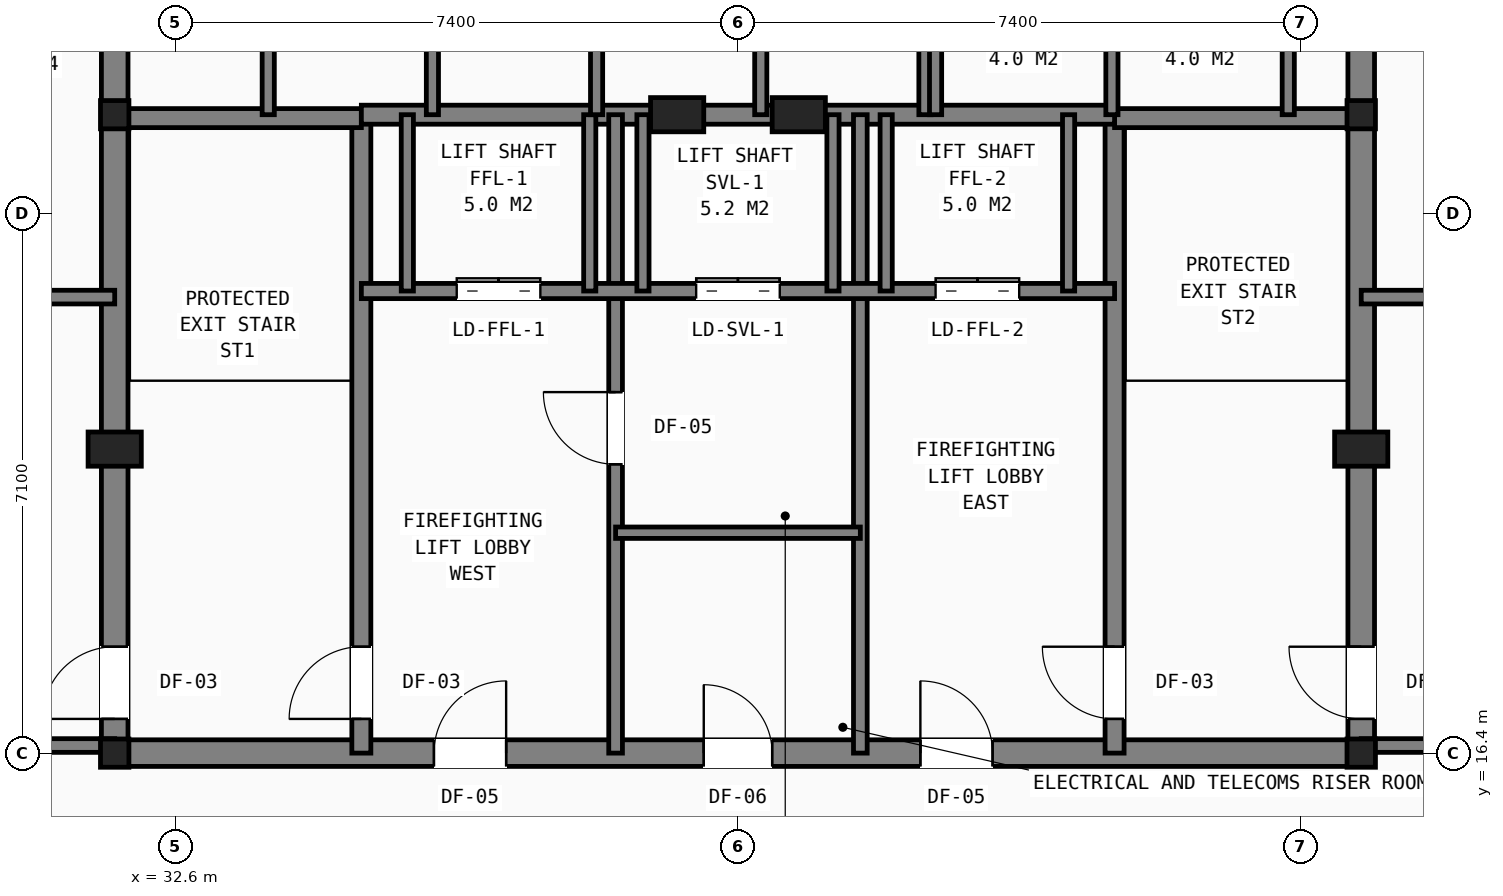
"""IFC4 building model, lengths in metres.
Left out: names, types, materials, properties, quantities, classifications, styles, units other than length and angle.
Written with IfcOpenShell. Run it as: python <this file> out.ifc"""

import sys

from ifc_helpers import new_model, si_unit, direction, frame, frame_2d, origin, origin_2d, place, context, subcontext, project, spatial, rectangle, i_section, extrude, element, fill, save


model = new_model("IFC4")
c1 = context("Model", 3, precision=1e-05, world=origin(), true_north=direction((0.0, 1.0)))
c2 = subcontext(c1, "Body", "Model", "MODEL_VIEW")
j1 = project(units=[si_unit("LENGTHUNIT", "METRE"), si_unit("PLANEANGLEUNIT", "RADIAN")], contexts=[c1])
p1 = place(None, origin())
s1 = spatial("IfcSite", under=j1, at=p1, CompositionType="ELEMENT")
p2 = place(p1, origin())
s2 = spatial("IfcBuilding", under=s1, at=p2, CompositionType="ELEMENT")
p3 = place(p2, frame((0.0, 0.0, 157.4)))
s3 = spatial("IfcBuildingStorey", under=s2, at=p3, CompositionType="ELEMENT", Elevation=157.4)
for number, where, z_axis, x_axis in (
    (1, (31.8, 16.4, 0.0), (0.0, 0.0, 1.0), (1.0, 0.0, 0.0)),
    (2, (48.2, 16.4, 0.0), (0.0, 0.0, 1.0), (1.0, 0.0, 0.0)),
    (3, (31.8, 24.8, 0.0), (0.0, 0.0, 1.0), (1.0, 0.0, 0.0)),
    (4, (48.2, 24.8, 0.0), (0.0, 0.0, 1.0), (1.0, 0.0, 0.0)),
):
    element("IfcColumn", number, at=place(p3, frame(where, z_axis=z_axis, x_axis=x_axis)), inside=s3, PredefinedType="COLUMN", context=c2, shape_type="SweptSolid", body=[
        extrude(i_section(OverallWidth=0.374, OverallDepth=0.372, WebThickness=0.016, FlangeThickness=0.026, at=origin_2d()), origin(), (0.0, 0.0, 1.0), 4.6),
    ])
for number, where, z_axis, x_axis in (
    (5, (31.8, 20.4, 0.0), (0.0, 0.0, 1.0), (1.0, 0.0, 0.0)),
    (6, (48.2, 20.4, 0.0), (0.0, 0.0, 1.0), (1.0, 0.0, 0.0)),
    (7, (39.2, 24.8, 0.0), (0.0, 0.0, 1.0), (1.0, 0.0, 0.0)),
    (8, (40.8, 24.8, 0.0), (0.0, 0.0, 1.0), (1.0, 0.0, 0.0)),
):
    element("IfcColumn", number, at=place(p3, frame(where, z_axis=z_axis, x_axis=x_axis)), inside=s3, PredefinedType="PILASTER", context=c2, shape_type="SweptSolid", body=[
        extrude(rectangle(XDim=0.7, YDim=0.45, at=origin_2d()), origin(), (0.0, 0.0, 1.0), 4.6),
    ])
p4 = place(p3, frame((31.8, 16.4, 0.0), z_axis=(0.0, 0.0, 1.0), x_axis=(1.0, 0.0, 0.0)))
e9 = element("IfcWall", 9, at=p4, inside=s3, PredefinedType="SHEAR", context=c2, shape_type="SweptSolid", body=[
    extrude(rectangle(XDim=16.4, YDim=0.35, at=frame_2d((8.2, 0.0))), origin(), (0.0, 0.0, 1.0), 4.36),
])
p5 = place(p4, frame((7.75, 0.0, 0.0)))
e10 = element("IfcOpeningElement", 10, at=p5, cuts=e9, PredefinedType="OPENING", context=c2, shape_type="SweptSolid", body=[
    extrude(rectangle(XDim=0.9, YDim=2.1, at=frame_2d((0.45, 1.05))), frame((0.0, 0.185, 0.0), z_axis=(0.0, -1.0, 0.0), x_axis=(1.0, 0.0, 0.0)), (0.0, 0.0, 1.0), 0.37),
])
p6 = place(p4, frame((4.2, 0.0, 0.0)))
e11 = element("IfcOpeningElement", 11, at=p6, cuts=e9, PredefinedType="OPENING", context=c2, shape_type="SweptSolid", body=[
    extrude(rectangle(XDim=0.95, YDim=2.1, at=frame_2d((0.475, 1.05))), frame((0.0, 0.185, 0.0), z_axis=(0.0, -1.0, 0.0), x_axis=(1.0, 0.0, 0.0)), (0.0, 0.0, 1.0), 0.37),
])
p7 = place(p4, frame((10.6, 0.0, 0.0)))
e12 = element("IfcOpeningElement", 12, at=p7, cuts=e9, PredefinedType="OPENING", context=c2, shape_type="SweptSolid", body=[
    extrude(rectangle(XDim=0.95, YDim=2.1, at=frame_2d((0.475, 1.05))), frame((0.0, 0.185, 0.0), z_axis=(0.0, -1.0, 0.0), x_axis=(1.0, 0.0, 0.0)), (0.0, 0.0, 1.0), 0.37),
])
p8 = place(p3, frame((31.8, 16.4, 0.0), z_axis=(0.0, 0.0, 1.0), x_axis=(0.0, 1.0, 0.0)))
e13 = element("IfcWall", 13, at=p8, inside=s3, PredefinedType="SHEAR", context=c2, shape_type="SweptSolid", body=[
    extrude(rectangle(XDim=14.8, YDim=0.35, at=frame_2d((7.4, 0.0))), origin(), (0.0, 0.0, 1.0), 4.36),
])
p9 = place(p8, frame((11.0, 0.0, 0.0)))
e14 = element("IfcOpeningElement", 14, at=p9, cuts=e13, PredefinedType="OPENING", context=c2, shape_type="SweptSolid", body=[
    extrude(rectangle(XDim=1.1, YDim=2.15, at=frame_2d((0.55, 1.075))), frame((0.0, 0.185, 0.0), z_axis=(0.0, -1.0, 0.0), x_axis=(1.0, 0.0, 0.0)), (0.0, 0.0, 1.0), 0.37),
])
p10 = place(p8, frame((0.45, 0.0, 0.0)))
e15 = element("IfcOpeningElement", 15, at=p10, cuts=e13, PredefinedType="OPENING", context=c2, shape_type="SweptSolid", body=[
    extrude(rectangle(XDim=0.95, YDim=2.1, at=frame_2d((0.475, 1.05))), frame((0.0, 0.185, 0.0), z_axis=(0.0, -1.0, 0.0), x_axis=(1.0, 0.0, 0.0)), (0.0, 0.0, 1.0), 0.37),
])
p11 = place(p3, frame((48.2, 16.4, 0.0), z_axis=(0.0, 0.0, 1.0), x_axis=(0.0, 1.0, 0.0)))
e16 = element("IfcWall", 16, at=p11, inside=s3, PredefinedType="SHEAR", context=c2, shape_type="SweptSolid", body=[
    extrude(rectangle(XDim=14.8, YDim=0.35, at=frame_2d((7.4, 0.0))), origin(), (0.0, 0.0, 1.0), 4.36),
])
p12 = place(p11, frame((11.0, 0.0, 0.0)))
e17 = element("IfcOpeningElement", 17, at=p12, cuts=e16, PredefinedType="OPENING", context=c2, shape_type="SweptSolid", body=[
    extrude(rectangle(XDim=1.1, YDim=2.15, at=frame_2d((0.55, 1.075))), frame((0.0, 0.185, 0.0), z_axis=(0.0, -1.0, 0.0), x_axis=(1.0, 0.0, 0.0)), (0.0, 0.0, 1.0), 0.37),
])
p13 = place(p11, frame((0.45, 0.0, 0.0)))
e18 = element("IfcOpeningElement", 18, at=p13, cuts=e16, PredefinedType="OPENING", context=c2, shape_type="SweptSolid", body=[
    extrude(rectangle(XDim=0.95, YDim=2.1, at=frame_2d((0.475, 1.05))), frame((0.0, 0.185, 0.0), z_axis=(0.0, -1.0, 0.0), x_axis=(1.0, 0.0, 0.0)), (0.0, 0.0, 1.0), 0.37),
])
p14 = place(p3, frame((35.045, 16.4, 0.0), z_axis=(0.0, 0.0, 1.0), x_axis=(0.0, 1.0, 0.0)))
e19 = element("IfcWall", 19, at=p14, inside=s3, PredefinedType="SHEAR", context=c2, shape_type="SweptSolid", body=[
    extrude(rectangle(XDim=8.4, YDim=0.25, at=frame_2d((4.2, 0.0))), origin(), (0.0, 0.0, 1.0), 4.36),
])
p15 = place(p14, frame((0.45, 0.0, 0.0)))
e20 = element("IfcOpeningElement", 20, at=p15, cuts=e19, PredefinedType="OPENING", context=c2, shape_type="SweptSolid", body=[
    extrude(rectangle(XDim=0.95, YDim=2.1, at=frame_2d((0.475, 1.05))), frame((0.0, 0.135, 0.0), z_axis=(0.0, -1.0, 0.0), x_axis=(1.0, 0.0, 0.0)), (0.0, 0.0, 1.0), 0.27),
])
p16 = place(p3, frame((31.8, 24.755, 0.0), z_axis=(0.0, 0.0, 1.0), x_axis=(1.0, 0.0, 0.0)))
e21 = element("IfcWall", 21, at=p16, inside=s3, PredefinedType="SHEAR", context=c2, shape_type="SweptSolid", body=[
    extrude(rectangle(XDim=3.245, YDim=0.25, at=frame_2d((1.623, 0.0))), origin(), (0.0, 0.0, 1.0), 4.36),
])
p17 = place(p3, frame((44.955, 16.4, 0.0), z_axis=(0.0, 0.0, 1.0), x_axis=(0.0, 1.0, 0.0)))
e22 = element("IfcWall", 22, at=p17, inside=s3, PredefinedType="SHEAR", context=c2, shape_type="SweptSolid", body=[
    extrude(rectangle(XDim=8.4, YDim=0.25, at=frame_2d((4.2, 0.0))), origin(), (0.0, 0.0, 1.0), 4.36),
])
p18 = place(p17, frame((0.45, 0.0, 0.0)))
e23 = element("IfcOpeningElement", 23, at=p18, cuts=e22, PredefinedType="OPENING", context=c2, shape_type="SweptSolid", body=[
    extrude(rectangle(XDim=0.95, YDim=2.1, at=frame_2d((0.475, 1.05))), frame((0.0, 0.135, 0.0), z_axis=(0.0, -1.0, 0.0), x_axis=(1.0, 0.0, 0.0)), (0.0, 0.0, 1.0), 0.27),
])
p19 = place(p3, frame((44.955, 24.755, 0.0), z_axis=(0.0, 0.0, 1.0), x_axis=(1.0, 0.0, 0.0)))
e24 = element("IfcWall", 24, at=p19, inside=s3, PredefinedType="SHEAR", context=c2, shape_type="SweptSolid", body=[
    extrude(rectangle(XDim=3.245, YDim=0.25, at=frame_2d((1.623, 0.0))), origin(), (0.0, 0.0, 1.0), 4.36),
])
p20 = place(p3, frame((35.045, 24.8, 0.0), z_axis=(0.0, 0.0, 1.0), x_axis=(1.0, 0.0, 0.0)))
e25 = element("IfcWall", 25, at=p20, inside=s3, PredefinedType="SHEAR", context=c2, shape_type="SweptSolid", body=[
    extrude(rectangle(XDim=9.91, YDim=0.25, at=frame_2d((4.955, 0.0))), origin(), (0.0, 0.0, 1.0), 4.36),
])
p21 = place(p3, frame((38.39, 16.4, 0.0), z_axis=(0.0, 0.0, 1.0), x_axis=(0.0, 1.0, 0.0)))
e26 = element("IfcWall", 26, at=p21, inside=s3, PredefinedType="PARTITIONING", context=c2, shape_type="SweptSolid", body=[
    extrude(rectangle(XDim=8.4, YDim=0.18, at=frame_2d((4.2, 0.0))), origin(), (0.0, 0.0, 1.0), 4.088),
])
p22 = place(p21, frame((3.8, 0.0, 0.0)))
e27 = element("IfcOpeningElement", 27, at=p22, cuts=e26, PredefinedType="OPENING", context=c2, shape_type="SweptSolid", body=[
    extrude(rectangle(XDim=0.95, YDim=2.1, at=frame_2d((0.475, 1.05))), frame((0.0, 0.1, 0.0), z_axis=(0.0, -1.0, 0.0), x_axis=(1.0, 0.0, 0.0)), (0.0, 0.0, 1.0), 0.2),
])
p23 = place(p3, frame((41.61, 16.4, 0.0), z_axis=(0.0, 0.0, 1.0), x_axis=(0.0, 1.0, 0.0)))
e28 = element("IfcWall", 28, at=p23, inside=s3, PredefinedType="PARTITIONING", context=c2, shape_type="SweptSolid", body=[
    extrude(rectangle(XDim=8.4, YDim=0.18, at=frame_2d((4.2, 0.0))), origin(), (0.0, 0.0, 1.0), 4.088),
])
p24 = place(p3, frame((35.045, 22.48, 0.0), z_axis=(0.0, 0.0, 1.0), x_axis=(1.0, 0.0, 0.0)))
e29 = element("IfcWall", 29, at=p24, inside=s3, PredefinedType="SOLIDWALL", context=c2, shape_type="SweptSolid", body=[
    extrude(rectangle(XDim=9.91, YDim=0.2, at=frame_2d((4.955, 0.0))), origin(), (0.0, 0.0, 1.0), 4.36),
])
p25 = place(p24, frame((1.255, 0.0, 0.0)))
e30 = element("IfcOpeningElement", 30, at=p25, cuts=e29, PredefinedType="OPENING", context=c2, shape_type="SweptSolid", body=[
    extrude(rectangle(XDim=1.1, YDim=2.15, at=frame_2d((0.55, 1.075))), frame((0.0, 0.11, 0.0), z_axis=(0.0, -1.0, 0.0), x_axis=(1.0, 0.0, 0.0)), (0.0, 0.0, 1.0), 0.22),
])
p26 = place(p24, frame((7.555, 0.0, 0.0)))
e31 = element("IfcOpeningElement", 31, at=p26, cuts=e29, PredefinedType="OPENING", context=c2, shape_type="SweptSolid", body=[
    extrude(rectangle(XDim=1.1, YDim=2.15, at=frame_2d((0.55, 1.075))), frame((0.0, 0.11, 0.0), z_axis=(0.0, -1.0, 0.0), x_axis=(1.0, 0.0, 0.0)), (0.0, 0.0, 1.0), 0.22),
])
p27 = place(p24, frame((4.405, 0.0, 0.0)))
e32 = element("IfcOpeningElement", 32, at=p27, cuts=e29, PredefinedType="OPENING", context=c2, shape_type="SweptSolid", body=[
    extrude(rectangle(XDim=1.1, YDim=2.15, at=frame_2d((0.55, 1.075))), frame((0.0, 0.11, 0.0), z_axis=(0.0, -1.0, 0.0), x_axis=(1.0, 0.0, 0.0)), (0.0, 0.0, 1.0), 0.22),
])
p28 = place(p3, frame((38.39, 19.3, 0.0), z_axis=(0.0, 0.0, 1.0), x_axis=(1.0, 0.0, 0.0)))
e33 = element("IfcWall", 33, at=p28, inside=s3, PredefinedType="PARTITIONING", context=c2, shape_type="SweptSolid", body=[
    extrude(rectangle(XDim=3.22, YDim=0.15, at=frame_2d((1.61, 0.0))), origin(), (0.0, 0.0, 1.0), 4.36),
])
for number, where, z_axis, x_axis in (
    (34, (35.65, 22.48, 0.0), (0.0, 0.0, 1.0), (0.0, 1.0, 0.0)),
    (35, (38.05, 22.48, 0.0), (0.0, 0.0, 1.0), (0.0, 1.0, 0.0)),
    (36, (41.95, 22.48, 0.0), (0.0, 0.0, 1.0), (0.0, 1.0, 0.0)),
    (37, (44.35, 22.48, 0.0), (0.0, 0.0, 1.0), (0.0, 1.0, 0.0)),
    (38, (38.75, 22.48, 0.0), (0.0, 0.0, 1.0), (0.0, 1.0, 0.0)),
    (39, (41.25, 22.48, 0.0), (0.0, 0.0, 1.0), (0.0, 1.0, 0.0)),
):
    element("IfcWall", number, at=place(p3, frame(where, z_axis=z_axis, x_axis=x_axis)), inside=s3, PredefinedType="SOLIDWALL", context=c2, shape_type="SweptSolid", body=[
        extrude(rectangle(XDim=2.32, YDim=0.16, at=frame_2d((1.16, 0.0))), origin(), (0.0, 0.0, 1.0), 4.36),
    ])
for number, where, z_axis, x_axis in (
    (40, (33.82, 24.8, 0.0), (0.0, 0.0, 1.0), (0.0, 1.0, 0.0)),
    (41, (35.98, 24.8, 0.0), (0.0, 0.0, 1.0), (0.0, 1.0, 0.0)),
    (42, (38.14, 24.8, 0.0), (0.0, 0.0, 1.0), (0.0, 1.0, 0.0)),
    (43, (40.3, 24.8, 0.0), (0.0, 0.0, 1.0), (0.0, 1.0, 0.0)),
    (44, (42.46, 24.8, 0.0), (0.0, 0.0, 1.0), (0.0, 1.0, 0.0)),
    (45, (42.6, 24.8, 0.0), (0.0, 0.0, 1.0), (0.0, 1.0, 0.0)),
    (46, (44.92, 24.8, 0.0), (0.0, 0.0, 1.0), (0.0, 1.0, 0.0)),
    (47, (47.24, 24.8, 0.0), (0.0, 0.0, 1.0), (0.0, 1.0, 0.0)),
):
    element("IfcWall", number, at=place(p3, frame(where, z_axis=z_axis, x_axis=x_axis)), inside=s3, PredefinedType="SOLIDWALL", context=c2, shape_type="SweptSolid", body=[
        extrude(rectangle(XDim=2.08, YDim=0.16, at=frame_2d((1.04, 0.0))), origin(), (0.0, 0.0, 1.0), 4.36),
    ])
p29 = place(p3, frame((25.8, 16.5, 0.0), z_axis=(0.0, 0.0, 1.0), x_axis=(1.0, 0.0, 0.0)))
e48 = element("IfcWall", 48, at=p29, inside=s3, PredefinedType="PARTITIONING", context=c2, shape_type="SweptSolid", body=[
    extrude(rectangle(XDim=6.0, YDim=0.18, at=frame_2d((3.0, 0.0))), origin(), (0.0, 0.0, 1.0), 3.375),
])
p30 = place(p3, frame((25.8, 22.4, 0.0), z_axis=(0.0, 0.0, 1.0), x_axis=(1.0, 0.0, 0.0)))
e49 = element("IfcWall", 49, at=p30, inside=s3, PredefinedType="PARTITIONING", context=c2, shape_type="SweptSolid", body=[
    extrude(rectangle(XDim=6.0, YDim=0.18, at=frame_2d((3.0, 0.0))), origin(), (0.0, 0.0, 1.0), 3.811),
])
p31 = place(p30, frame((1.6, 0.0, 0.0)))
e50 = element("IfcOpeningElement", 50, at=p31, cuts=e49, PredefinedType="OPENING", context=c2, shape_type="SweptSolid", body=[
    extrude(rectangle(XDim=1.0, YDim=2.15, at=frame_2d((0.5, 1.075))), frame((0.0, 0.1, 0.0), z_axis=(0.0, -1.0, 0.0), x_axis=(1.0, 0.0, 0.0)), (0.0, 0.0, 1.0), 0.2),
])
p32 = place(p3, frame((48.2, 16.5, 0.0), z_axis=(0.0, 0.0, 1.0), x_axis=(1.0, 0.0, 0.0)))
e51 = element("IfcWall", 51, at=p32, inside=s3, PredefinedType="PARTITIONING", context=c2, shape_type="SweptSolid", body=[
    extrude(rectangle(XDim=6.0, YDim=0.18, at=frame_2d((3.0, 0.0))), origin(), (0.0, 0.0, 1.0), 3.811),
])
p33 = place(p3, frame((48.2, 22.4, 0.0), z_axis=(0.0, 0.0, 1.0), x_axis=(1.0, 0.0, 0.0)))
e52 = element("IfcWall", 52, at=p33, inside=s3, PredefinedType="PARTITIONING", context=c2, shape_type="SweptSolid", body=[
    extrude(rectangle(XDim=6.0, YDim=0.18, at=frame_2d((3.0, 0.0))), origin(), (0.0, 0.0, 1.0), 3.811),
])
p34 = place(p33, frame((1.6, 0.0, 0.0)))
e53 = element("IfcOpeningElement", 53, at=p34, cuts=e52, PredefinedType="OPENING", context=c2, shape_type="SweptSolid", body=[
    extrude(rectangle(XDim=1.0, YDim=2.15, at=frame_2d((0.5, 1.075))), frame((0.0, 0.1, 0.0), z_axis=(0.0, -1.0, 0.0), x_axis=(1.0, 0.0, 0.0)), (0.0, 0.0, 1.0), 0.2),
])
p35 = place(p5, origin())
e54 = element("IfcDoor", 54, at=p35, inside=s3, OperationType="SINGLE_SWING_LEFT", PredefinedType="DOOR", context=c2, shape_type="SweptSolid", body=[
    extrude(rectangle(XDim=0.9, YDim=2.1, at=frame_2d((0.45, 1.05))), frame((0.0, 0.025, 0.0), z_axis=(0.0, -1.0, 0.0), x_axis=(1.0, 0.0, 0.0)), (0.0, 0.0, 1.0), 0.05),
])
fill(e10, e54)
p36 = place(p22, origin())
e55 = element("IfcDoor", 55, at=p36, inside=s3, OperationType="SINGLE_SWING_RIGHT", PredefinedType="DOOR", context=c2, shape_type="SweptSolid", body=[
    extrude(rectangle(XDim=0.95, YDim=2.1, at=frame_2d((0.475, 1.05))), frame((0.0, 0.025, 0.0), z_axis=(0.0, -1.0, 0.0), x_axis=(1.0, 0.0, 0.0)), (0.0, 0.0, 1.0), 0.05),
])
fill(e27, e55)
p37 = place(p15, origin())
e56 = element("IfcDoor", 56, at=p37, inside=s3, OperationType="SINGLE_SWING_LEFT", PredefinedType="DOOR", context=c2, shape_type="SweptSolid", body=[
    extrude(rectangle(XDim=0.95, YDim=2.1, at=frame_2d((0.475, 1.05))), frame((0.0, 0.025, 0.0), z_axis=(0.0, -1.0, 0.0), x_axis=(1.0, 0.0, 0.0)), (0.0, 0.0, 1.0), 0.05),
])
fill(e20, e56)
p38 = place(p18, origin())
e57 = element("IfcDoor", 57, at=p38, inside=s3, OperationType="SINGLE_SWING_RIGHT", PredefinedType="DOOR", context=c2, shape_type="SweptSolid", body=[
    extrude(rectangle(XDim=0.95, YDim=2.1, at=frame_2d((0.475, 1.05))), frame((0.0, 0.025, 0.0), z_axis=(0.0, -1.0, 0.0), x_axis=(1.0, 0.0, 0.0)), (0.0, 0.0, 1.0), 0.05),
])
fill(e23, e57)
p39 = place(p6, origin())
e58 = element("IfcDoor", 58, at=p39, inside=s3, OperationType="SINGLE_SWING_RIGHT", PredefinedType="DOOR", context=c2, shape_type="SweptSolid", body=[
    extrude(rectangle(XDim=0.95, YDim=2.1, at=frame_2d((0.475, 1.05))), frame((0.0, 0.025, 0.0), z_axis=(0.0, -1.0, 0.0), x_axis=(1.0, 0.0, 0.0)), (0.0, 0.0, 1.0), 0.05),
])
fill(e11, e58)
p40 = place(p7, origin())
e59 = element("IfcDoor", 59, at=p40, inside=s3, OperationType="SINGLE_SWING_LEFT", PredefinedType="DOOR", context=c2, shape_type="SweptSolid", body=[
    extrude(rectangle(XDim=0.95, YDim=2.1, at=frame_2d((0.475, 1.05))), frame((0.0, 0.025, 0.0), z_axis=(0.0, -1.0, 0.0), x_axis=(1.0, 0.0, 0.0)), (0.0, 0.0, 1.0), 0.05),
])
fill(e12, e59)
p41 = place(p25, origin())
e60 = element("IfcDoor", 60, at=p41, inside=s3, OperationType="DOUBLE_DOOR_SLIDING", PredefinedType="DOOR", context=c2, shape_type="SweptSolid", body=[
    extrude(rectangle(XDim=1.1, YDim=2.15, at=frame_2d((0.55, 1.075))), frame((0.0, 0.025, 0.0), z_axis=(0.0, -1.0, 0.0), x_axis=(1.0, 0.0, 0.0)), (0.0, 0.0, 1.0), 0.05),
])
fill(e30, e60)
p42 = place(p26, origin())
e61 = element("IfcDoor", 61, at=p42, inside=s3, OperationType="DOUBLE_DOOR_SLIDING", PredefinedType="DOOR", context=c2, shape_type="SweptSolid", body=[
    extrude(rectangle(XDim=1.1, YDim=2.15, at=frame_2d((0.55, 1.075))), frame((0.0, 0.025, 0.0), z_axis=(0.0, -1.0, 0.0), x_axis=(1.0, 0.0, 0.0)), (0.0, 0.0, 1.0), 0.05),
])
fill(e31, e61)
p43 = place(p27, origin())
e62 = element("IfcDoor", 62, at=p43, inside=s3, OperationType="DOUBLE_DOOR_SLIDING", PredefinedType="DOOR", context=c2, shape_type="SweptSolid", body=[
    extrude(rectangle(XDim=1.1, YDim=2.15, at=frame_2d((0.55, 1.075))), frame((0.0, 0.025, 0.0), z_axis=(0.0, -1.0, 0.0), x_axis=(1.0, 0.0, 0.0)), (0.0, 0.0, 1.0), 0.05),
])
fill(e32, e62)
p44 = place(p10, origin())
e63 = element("IfcDoor", 63, at=p44, inside=s3, OperationType="SINGLE_SWING_LEFT", PredefinedType="DOOR", context=c2, shape_type="SweptSolid", body=[
    extrude(rectangle(XDim=0.95, YDim=2.1, at=frame_2d((0.475, 1.05))), frame((0.0, 0.025, 0.0), z_axis=(0.0, -1.0, 0.0), x_axis=(1.0, 0.0, 0.0)), (0.0, 0.0, 1.0), 0.05),
])
fill(e15, e63)
p45 = place(p13, origin())
e64 = element("IfcDoor", 64, at=p45, inside=s3, OperationType="SINGLE_SWING_RIGHT", PredefinedType="DOOR", context=c2, shape_type="SweptSolid", body=[
    extrude(rectangle(XDim=0.95, YDim=2.1, at=frame_2d((0.475, 1.05))), frame((0.0, 0.025, 0.0), z_axis=(0.0, -1.0, 0.0), x_axis=(1.0, 0.0, 0.0)), (0.0, 0.0, 1.0), 0.05),
])
fill(e18, e64)
save(model, sys.argv[1])
